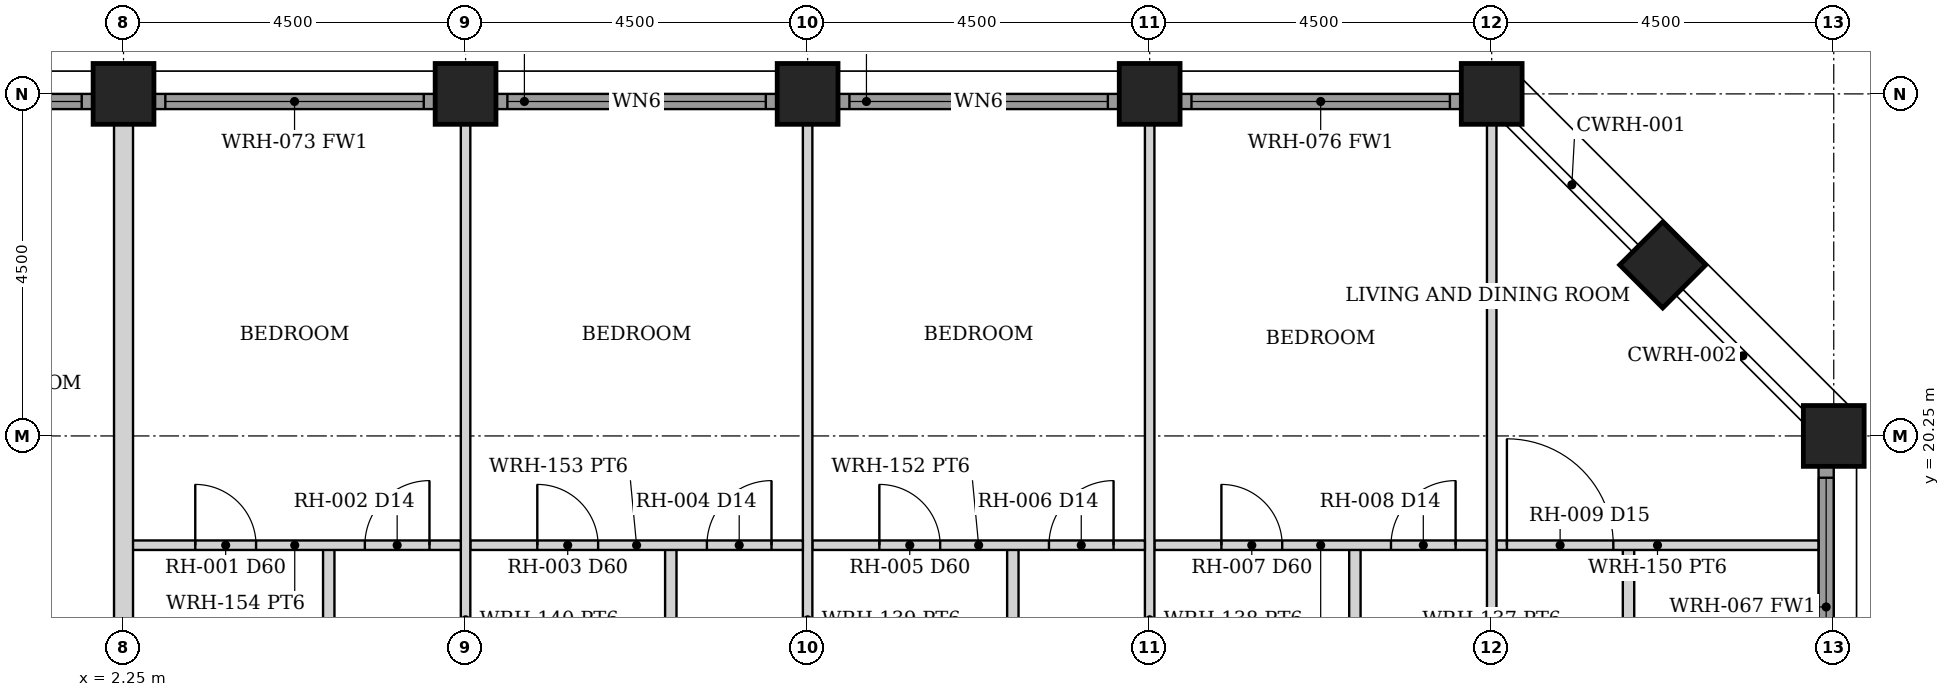
"""IFC4 building model, lengths in metres.
Left out: names, types, materials, properties, quantities, classifications, styles, units other than length and angle.
Written with IfcOpenShell. Run it as: python <this file> out.ifc"""

import sys

from ifc_helpers import new_model, si_unit, direction, frame, frame_2d, origin, origin_2d, place, context, subcontext, project, spatial, rectangle, hollow_rectangle, extrude, element, fill, save


model = new_model("IFC4")
c1 = context("Model", 3, precision=1e-05, world=origin(), true_north=direction((0.0, 1.0)))
c2 = subcontext(c1, "Body", "Model", "MODEL_VIEW")
j1 = project(units=[si_unit("LENGTHUNIT", "METRE"), si_unit("PLANEANGLEUNIT", "RADIAN")], contexts=[c1])
p1 = place(None, origin())
s1 = spatial("IfcSite", under=j1, at=p1, CompositionType="ELEMENT")
p2 = place(p1, origin())
s2 = spatial("IfcBuilding", under=s1, at=p2, CompositionType="ELEMENT")
p3 = place(p2, frame((0.0, 0.0, 103.5)))
s3 = spatial("IfcBuildingStorey", under=s2, at=p3, CompositionType="ELEMENT", Elevation=103.5)
for number, where, z_axis, x_axis in (
    (1, (2.25, 24.75, 0.0), (0.0, 0.0, 1.0), (0.0, 1.0, 0.0)),
    (2, (6.75, 24.75, 0.0), (0.0, 0.0, 1.0), (0.0, 1.0, 0.0)),
    (3, (11.25, 24.75, 0.0), (0.0, 0.0, 1.0), (0.0, 1.0, 0.0)),
    (4, (15.75, 24.75, 0.0), (0.0, 0.0, 1.0), (0.0, 1.0, 0.0)),
    (5, (20.25, 24.75, 0.0), (0.0, 0.0, 1.0), (0.0, 1.0, 0.0)),
    (6, (24.75, 20.25, 0.0), (0.0, 0.0, 1.0), (1.0, 0.0, 0.0)),
    (7, (22.5, 22.5, 0.0), (0.0, 0.0, 1.0), (0.707, 0.707, 0.0)),
):
    element("IfcColumn", number, at=place(p3, frame(where, z_axis=z_axis, x_axis=x_axis)), inside=s3, PredefinedType="COLUMN", context=c2, shape_type="SweptSolid", body=[
        extrude(hollow_rectangle(XDim=0.8, YDim=0.8, WallThickness=0.06, at=origin_2d()), origin(), (0.0, 0.0, 1.0), 3.5),
    ])
p4 = place(p3, frame((24.65, 16.155, 0.0), z_axis=(0.0, 0.0, 1.0), x_axis=(0.0, 1.0, 0.0)))
e8 = element("IfcWall", 8, at=p4, inside=s3, PredefinedType="SOLIDWALL", context=c2, shape_type="SweptSolid", body=[
    extrude(rectangle(XDim=3.69, YDim=0.2, at=frame_2d((1.845, 0.0))), origin(), (0.0, 0.0, 1.0), 2.279),
])
p5 = place(p4, frame((0.145, 0.0, 0.3)))
e9 = element("IfcOpeningElement", 9, at=p5, cuts=e8, PredefinedType="OPENING", context=c2, shape_type="SweptSolid", body=[
    extrude(rectangle(XDim=3.4, YDim=1.829, at=frame_2d((1.7, 0.915))), frame((0.0, 0.11, 0.0), z_axis=(0.0, -1.0, 0.0), x_axis=(1.0, 0.0, 0.0)), (0.0, 0.0, 1.0), 0.22),
])
p6 = place(p3, frame((-1.845, 24.65, 0.0), z_axis=(0.0, 0.0, 1.0), x_axis=(1.0, 0.0, 0.0)))
e10 = element("IfcWall", 10, at=p6, inside=s3, PredefinedType="SOLIDWALL", context=c2, shape_type="SweptSolid", body=[
    extrude(rectangle(XDim=3.69, YDim=0.2, at=frame_2d((1.845, 0.0))), origin(), (0.0, 0.0, 1.0), 2.279),
])
p7 = place(p6, frame((0.145, 0.0, 0.3)))
e11 = element("IfcOpeningElement", 11, at=p7, cuts=e10, PredefinedType="OPENING", context=c2, shape_type="SweptSolid", body=[
    extrude(rectangle(XDim=3.4, YDim=1.829, at=frame_2d((1.7, 0.915))), frame((0.0, 0.11, 0.0), z_axis=(0.0, -1.0, 0.0), x_axis=(1.0, 0.0, 0.0)), (0.0, 0.0, 1.0), 0.22),
])
p8 = place(p3, frame((2.655, 24.65, 0.0), z_axis=(0.0, 0.0, 1.0), x_axis=(1.0, 0.0, 0.0)))
e12 = element("IfcWall", 12, at=p8, inside=s3, PredefinedType="SOLIDWALL", context=c2, shape_type="SweptSolid", body=[
    extrude(rectangle(XDim=3.69, YDim=0.2, at=frame_2d((1.845, 0.0))), origin(), (0.0, 0.0, 1.0), 2.279),
])
p9 = place(p8, frame((0.145, 0.0, 0.3)))
e13 = element("IfcOpeningElement", 13, at=p9, cuts=e12, PredefinedType="OPENING", context=c2, shape_type="SweptSolid", body=[
    extrude(rectangle(XDim=3.4, YDim=1.829, at=frame_2d((1.7, 0.915))), frame((0.0, 0.11, 0.0), z_axis=(0.0, -1.0, 0.0), x_axis=(1.0, 0.0, 0.0)), (0.0, 0.0, 1.0), 0.22),
])
p10 = place(p3, frame((7.155, 24.65, 0.0), z_axis=(0.0, 0.0, 1.0), x_axis=(1.0, 0.0, 0.0)))
e14 = element("IfcWall", 14, at=p10, inside=s3, PredefinedType="SOLIDWALL", context=c2, shape_type="SweptSolid", body=[
    extrude(rectangle(XDim=3.69, YDim=0.2, at=frame_2d((1.845, 0.0))), origin(), (0.0, 0.0, 1.0), 2.279),
])
p11 = place(p10, frame((0.145, 0.0, 0.3)))
e15 = element("IfcOpeningElement", 15, at=p11, cuts=e14, PredefinedType="OPENING", context=c2, shape_type="SweptSolid", body=[
    extrude(rectangle(XDim=3.4, YDim=1.829, at=frame_2d((1.7, 0.915))), frame((0.0, 0.11, 0.0), z_axis=(0.0, -1.0, 0.0), x_axis=(1.0, 0.0, 0.0)), (0.0, 0.0, 1.0), 0.22),
])
p12 = place(p3, frame((11.655, 24.65, 0.0), z_axis=(0.0, 0.0, 1.0), x_axis=(1.0, 0.0, 0.0)))
e16 = element("IfcWall", 16, at=p12, inside=s3, PredefinedType="SOLIDWALL", context=c2, shape_type="SweptSolid", body=[
    extrude(rectangle(XDim=3.69, YDim=0.2, at=frame_2d((1.845, 0.0))), origin(), (0.0, 0.0, 1.0), 2.279),
])
p13 = place(p12, frame((0.145, 0.0, 0.3)))
e17 = element("IfcOpeningElement", 17, at=p13, cuts=e16, PredefinedType="OPENING", context=c2, shape_type="SweptSolid", body=[
    extrude(rectangle(XDim=3.4, YDim=1.829, at=frame_2d((1.7, 0.915))), frame((0.0, 0.11, 0.0), z_axis=(0.0, -1.0, 0.0), x_axis=(1.0, 0.0, 0.0)), (0.0, 0.0, 1.0), 0.22),
])
p14 = place(p3, frame((16.155, 24.65, 0.0), z_axis=(0.0, 0.0, 1.0), x_axis=(1.0, 0.0, 0.0)))
e18 = element("IfcWall", 18, at=p14, inside=s3, PredefinedType="SOLIDWALL", context=c2, shape_type="SweptSolid", body=[
    extrude(rectangle(XDim=3.69, YDim=0.2, at=frame_2d((1.845, 0.0))), origin(), (0.0, 0.0, 1.0), 2.279),
])
p15 = place(p14, frame((0.145, 0.0, 0.3)))
e19 = element("IfcOpeningElement", 19, at=p15, cuts=e18, PredefinedType="OPENING", context=c2, shape_type="SweptSolid", body=[
    extrude(rectangle(XDim=3.4, YDim=1.829, at=frame_2d((1.7, 0.915))), frame((0.0, 0.11, 0.0), z_axis=(0.0, -1.0, 0.0), x_axis=(1.0, 0.0, 0.0)), (0.0, 0.0, 1.0), 0.22),
])
p16 = place(p3, frame((22.05, 11.312, 0.0), z_axis=(0.0, 0.0, 1.0), x_axis=(0.0, 1.0, 0.0)))
e20 = element("IfcWall", 20, at=p16, inside=s3, PredefinedType="PARTITIONING", context=c2, shape_type="SweptSolid", body=[
    extrude(rectangle(XDim=7.5, YDim=0.15, at=frame_2d((3.75, 0.0))), origin(), (0.0, 0.0, 1.0), 2.279),
])
p17 = place(p16, frame((3.3, 0.0, 0.0)))
e21 = element("IfcOpeningElement", 21, at=p17, cuts=e20, PredefinedType="OPENING", context=c2, shape_type="SweptSolid", body=[
    extrude(rectangle(XDim=0.9, YDim=2.1, at=frame_2d((0.45, 1.05))), frame((0.0, 0.085, 0.0), z_axis=(0.0, -1.0, 0.0), x_axis=(1.0, 0.0, 0.0)), (0.0, 0.0, 1.0), 0.17),
])
p18 = place(p3, frame((20.312, 18.812, 0.0), z_axis=(0.0, 0.0, 1.0), x_axis=(1.0, 0.0, 0.0)))
e22 = element("IfcWall", 22, at=p18, inside=s3, PredefinedType="PARTITIONING", context=c2, shape_type="SweptSolid", body=[
    extrude(rectangle(XDim=4.238, YDim=0.125, at=frame_2d((2.119, 0.0))), origin(), (0.0, 0.0, 1.0), 2.279),
])
p19 = place(p18, frame((0.137, 0.0, 0.0)))
e23 = element("IfcOpeningElement", 23, at=p19, cuts=e22, PredefinedType="OPENING", context=c2, shape_type="SweptSolid", body=[
    extrude(rectangle(XDim=1.4, YDim=2.1, at=frame_2d((0.7, 1.05))), frame((0.0, 0.073, 0.0), z_axis=(0.0, -1.0, 0.0), x_axis=(1.0, 0.0, 0.0)), (0.0, 0.0, 1.0), 0.145),
])
p20 = place(p3, frame((20.25, 11.312, 0.0), z_axis=(0.0, 0.0, 1.0), x_axis=(0.0, 1.0, 0.0)))
e24 = element("IfcWall", 24, at=p20, inside=s3, PredefinedType="PARTITIONING", context=c2, shape_type="SweptSolid", body=[
    extrude(rectangle(XDim=13.038, YDim=0.125, at=frame_2d((6.519, 0.0))), origin(), (0.0, 0.0, 1.0), 2.279),
])
p21 = place(p3, frame((18.45, 11.312, 0.0), z_axis=(0.0, 0.0, 1.0), x_axis=(0.0, 1.0, 0.0)))
e25 = element("IfcWall", 25, at=p21, inside=s3, PredefinedType="PARTITIONING", context=c2, shape_type="SweptSolid", body=[
    extrude(rectangle(XDim=7.5, YDim=0.15, at=frame_2d((3.75, 0.0))), origin(), (0.0, 0.0, 1.0), 2.279),
])
p22 = place(p21, frame((0.9, 0.0, 0.0)))
e26 = element("IfcOpeningElement", 26, at=p22, cuts=e25, PredefinedType="OPENING", context=c2, shape_type="SweptSolid", body=[
    extrude(rectangle(XDim=0.8, YDim=2.1, at=frame_2d((0.4, 1.05))), frame((0.0, 0.085, 0.0), z_axis=(0.0, -1.0, 0.0), x_axis=(1.0, 0.0, 0.0)), (0.0, 0.0, 1.0), 0.17),
])
p23 = place(p3, frame((15.812, 18.812, 0.0), z_axis=(0.0, 0.0, 1.0), x_axis=(1.0, 0.0, 0.0)))
e27 = element("IfcWall", 27, at=p23, inside=s3, PredefinedType="PARTITIONING", context=c2, shape_type="SweptSolid", body=[
    extrude(rectangle(XDim=4.375, YDim=0.125, at=frame_2d((2.188, 0.0))), origin(), (0.0, 0.0, 1.0), 2.279),
])
p24 = place(p23, frame((3.113, 0.0, 0.0)))
e28 = element("IfcOpeningElement", 28, at=p24, cuts=e27, PredefinedType="OPENING", context=c2, shape_type="SweptSolid", body=[
    extrude(rectangle(XDim=0.85, YDim=2.1, at=frame_2d((0.425, 1.05))), frame((0.0, 0.073, 0.0), z_axis=(0.0, -1.0, 0.0), x_axis=(1.0, 0.0, 0.0)), (0.0, 0.0, 1.0), 0.145),
])
p25 = place(p23, frame((0.881, 0.0, 0.0)))
e29 = element("IfcOpeningElement", 29, at=p25, cuts=e27, PredefinedType="OPENING", context=c2, shape_type="SweptSolid", body=[
    extrude(rectangle(XDim=0.8, YDim=2.1, at=frame_2d((0.4, 1.05))), frame((0.0, 0.073, 0.0), z_axis=(0.0, -1.0, 0.0), x_axis=(1.0, 0.0, 0.0)), (0.0, 0.0, 1.0), 0.145),
])
p26 = place(p3, frame((15.75, 11.312, 0.0), z_axis=(0.0, 0.0, 1.0), x_axis=(0.0, 1.0, 0.0)))
e30 = element("IfcWall", 30, at=p26, inside=s3, PredefinedType="PARTITIONING", context=c2, shape_type="SweptSolid", body=[
    extrude(rectangle(XDim=13.038, YDim=0.125, at=frame_2d((6.519, 0.0))), origin(), (0.0, 0.0, 1.0), 2.279),
])
p27 = place(p3, frame((13.95, 11.312, 0.0), z_axis=(0.0, 0.0, 1.0), x_axis=(0.0, 1.0, 0.0)))
e31 = element("IfcWall", 31, at=p27, inside=s3, PredefinedType="PARTITIONING", context=c2, shape_type="SweptSolid", body=[
    extrude(rectangle(XDim=7.5, YDim=0.15, at=frame_2d((3.75, 0.0))), origin(), (0.0, 0.0, 1.0), 2.279),
])
p28 = place(p27, frame((0.9, 0.0, 0.0)))
e32 = element("IfcOpeningElement", 32, at=p28, cuts=e31, PredefinedType="OPENING", context=c2, shape_type="SweptSolid", body=[
    extrude(rectangle(XDim=0.8, YDim=2.1, at=frame_2d((0.4, 1.05))), frame((0.0, 0.085, 0.0), z_axis=(0.0, -1.0, 0.0), x_axis=(1.0, 0.0, 0.0)), (0.0, 0.0, 1.0), 0.17),
])
p29 = place(p3, frame((11.312, 18.812, 0.0), z_axis=(0.0, 0.0, 1.0), x_axis=(1.0, 0.0, 0.0)))
e33 = element("IfcWall", 33, at=p29, inside=s3, PredefinedType="PARTITIONING", context=c2, shape_type="SweptSolid", body=[
    extrude(rectangle(XDim=4.375, YDim=0.125, at=frame_2d((2.188, 0.0))), origin(), (0.0, 0.0, 1.0), 2.279),
])
p30 = place(p29, frame((3.113, 0.0, 0.0)))
e34 = element("IfcOpeningElement", 34, at=p30, cuts=e33, PredefinedType="OPENING", context=c2, shape_type="SweptSolid", body=[
    extrude(rectangle(XDim=0.85, YDim=2.1, at=frame_2d((0.425, 1.05))), frame((0.0, 0.073, 0.0), z_axis=(0.0, -1.0, 0.0), x_axis=(1.0, 0.0, 0.0)), (0.0, 0.0, 1.0), 0.145),
])
p31 = place(p29, frame((0.881, 0.0, 0.0)))
e35 = element("IfcOpeningElement", 35, at=p31, cuts=e33, PredefinedType="OPENING", context=c2, shape_type="SweptSolid", body=[
    extrude(rectangle(XDim=0.8, YDim=2.1, at=frame_2d((0.4, 1.05))), frame((0.0, 0.073, 0.0), z_axis=(0.0, -1.0, 0.0), x_axis=(1.0, 0.0, 0.0)), (0.0, 0.0, 1.0), 0.145),
])
p32 = place(p3, frame((11.25, 11.312, 0.0), z_axis=(0.0, 0.0, 1.0), x_axis=(0.0, 1.0, 0.0)))
e36 = element("IfcWall", 36, at=p32, inside=s3, PredefinedType="PARTITIONING", context=c2, shape_type="SweptSolid", body=[
    extrude(rectangle(XDim=13.038, YDim=0.125, at=frame_2d((6.519, 0.0))), origin(), (0.0, 0.0, 1.0), 2.279),
])
p33 = place(p3, frame((9.45, 11.312, 0.0), z_axis=(0.0, 0.0, 1.0), x_axis=(0.0, 1.0, 0.0)))
e37 = element("IfcWall", 37, at=p33, inside=s3, PredefinedType="PARTITIONING", context=c2, shape_type="SweptSolid", body=[
    extrude(rectangle(XDim=7.5, YDim=0.15, at=frame_2d((3.75, 0.0))), origin(), (0.0, 0.0, 1.0), 2.279),
])
p34 = place(p33, frame((0.9, 0.0, 0.0)))
e38 = element("IfcOpeningElement", 38, at=p34, cuts=e37, PredefinedType="OPENING", context=c2, shape_type="SweptSolid", body=[
    extrude(rectangle(XDim=0.8, YDim=2.1, at=frame_2d((0.4, 1.05))), frame((0.0, 0.085, 0.0), z_axis=(0.0, -1.0, 0.0), x_axis=(1.0, 0.0, 0.0)), (0.0, 0.0, 1.0), 0.17),
])
p35 = place(p3, frame((6.812, 18.812, 0.0), z_axis=(0.0, 0.0, 1.0), x_axis=(1.0, 0.0, 0.0)))
e39 = element("IfcWall", 39, at=p35, inside=s3, PredefinedType="PARTITIONING", context=c2, shape_type="SweptSolid", body=[
    extrude(rectangle(XDim=4.375, YDim=0.125, at=frame_2d((2.188, 0.0))), origin(), (0.0, 0.0, 1.0), 2.279),
])
p36 = place(p35, frame((3.113, 0.0, 0.0)))
e40 = element("IfcOpeningElement", 40, at=p36, cuts=e39, PredefinedType="OPENING", context=c2, shape_type="SweptSolid", body=[
    extrude(rectangle(XDim=0.85, YDim=2.1, at=frame_2d((0.425, 1.05))), frame((0.0, 0.073, 0.0), z_axis=(0.0, -1.0, 0.0), x_axis=(1.0, 0.0, 0.0)), (0.0, 0.0, 1.0), 0.145),
])
p37 = place(p35, frame((0.881, 0.0, 0.0)))
e41 = element("IfcOpeningElement", 41, at=p37, cuts=e39, PredefinedType="OPENING", context=c2, shape_type="SweptSolid", body=[
    extrude(rectangle(XDim=0.8, YDim=2.1, at=frame_2d((0.4, 1.05))), frame((0.0, 0.073, 0.0), z_axis=(0.0, -1.0, 0.0), x_axis=(1.0, 0.0, 0.0)), (0.0, 0.0, 1.0), 0.145),
])
p38 = place(p3, frame((6.75, 11.312, 0.0), z_axis=(0.0, 0.0, 1.0), x_axis=(0.0, 1.0, 0.0)))
e42 = element("IfcWall", 42, at=p38, inside=s3, PredefinedType="PARTITIONING", context=c2, shape_type="SweptSolid", body=[
    extrude(rectangle(XDim=13.038, YDim=0.125, at=frame_2d((6.519, 0.0))), origin(), (0.0, 0.0, 1.0), 2.279),
])
p39 = place(p3, frame((4.95, 11.312, 0.0), z_axis=(0.0, 0.0, 1.0), x_axis=(0.0, 1.0, 0.0)))
e43 = element("IfcWall", 43, at=p39, inside=s3, PredefinedType="PARTITIONING", context=c2, shape_type="SweptSolid", body=[
    extrude(rectangle(XDim=7.5, YDim=0.15, at=frame_2d((3.75, 0.0))), origin(), (0.0, 0.0, 1.0), 2.279),
])
p40 = place(p39, frame((0.9, 0.0, 0.0)))
e44 = element("IfcOpeningElement", 44, at=p40, cuts=e43, PredefinedType="OPENING", context=c2, shape_type="SweptSolid", body=[
    extrude(rectangle(XDim=0.8, YDim=2.1, at=frame_2d((0.4, 1.05))), frame((0.0, 0.085, 0.0), z_axis=(0.0, -1.0, 0.0), x_axis=(1.0, 0.0, 0.0)), (0.0, 0.0, 1.0), 0.17),
])
p41 = place(p3, frame((2.317, 18.812, 0.0), z_axis=(0.0, 0.0, 1.0), x_axis=(1.0, 0.0, 0.0)))
e45 = element("IfcWall", 45, at=p41, inside=s3, PredefinedType="PARTITIONING", context=c2, shape_type="SweptSolid", body=[
    extrude(rectangle(XDim=4.37, YDim=0.125, at=frame_2d((2.185, 0.0))), origin(), (0.0, 0.0, 1.0), 2.279),
])
p42 = place(p41, frame((3.107, 0.0, 0.0)))
e46 = element("IfcOpeningElement", 46, at=p42, cuts=e45, PredefinedType="OPENING", context=c2, shape_type="SweptSolid", body=[
    extrude(rectangle(XDim=0.85, YDim=2.1, at=frame_2d((0.425, 1.05))), frame((0.0, 0.073, 0.0), z_axis=(0.0, -1.0, 0.0), x_axis=(1.0, 0.0, 0.0)), (0.0, 0.0, 1.0), 0.145),
])
p43 = place(p41, frame((0.876, 0.0, 0.0)))
e47 = element("IfcOpeningElement", 47, at=p43, cuts=e45, PredefinedType="OPENING", context=c2, shape_type="SweptSolid", body=[
    extrude(rectangle(XDim=0.8, YDim=2.1, at=frame_2d((0.4, 1.05))), frame((0.0, 0.073, 0.0), z_axis=(0.0, -1.0, 0.0), x_axis=(1.0, 0.0, 0.0)), (0.0, 0.0, 1.0), 0.145),
])
p44 = place(p3, frame((2.25, 9.2, 0.0), z_axis=(0.0, 0.0, 1.0), x_axis=(0.0, 1.0, 0.0)))
e48 = element("IfcWall", 48, at=p44, inside=s3, PredefinedType="PARTITIONING", context=c2, shape_type="SweptSolid", body=[
    extrude(rectangle(XDim=15.15, YDim=0.25, at=frame_2d((7.575, 0.0))), origin(), (0.0, 0.0, 1.0), 2.279),
])
p45 = place(p5, origin())
e49 = element("IfcWindow", 49, at=p45, inside=s3, PartitioningType="SINGLE_PANEL", PredefinedType="WINDOW", context=c2, shape_type="SweptSolid", body=[
    extrude(rectangle(XDim=3.4, YDim=1.829, at=frame_2d((1.7, 0.915))), frame((0.0, 0.03, 0.0), z_axis=(0.0, -1.0, 0.0), x_axis=(1.0, 0.0, 0.0)), (0.0, 0.0, 1.0), 0.06),
])
fill(e9, e49)
p46 = place(p7, origin())
e50 = element("IfcWindow", 50, at=p46, inside=s3, PartitioningType="SINGLE_PANEL", PredefinedType="WINDOW", context=c2, shape_type="SweptSolid", body=[
    extrude(rectangle(XDim=3.4, YDim=1.829, at=frame_2d((1.7, 0.915))), frame((0.0, 0.03, 0.0), z_axis=(0.0, -1.0, 0.0), x_axis=(1.0, 0.0, 0.0)), (0.0, 0.0, 1.0), 0.06),
])
fill(e11, e50)
p47 = place(p9, origin())
e51 = element("IfcWindow", 51, at=p47, inside=s3, PartitioningType="SINGLE_PANEL", PredefinedType="WINDOW", context=c2, shape_type="SweptSolid", body=[
    extrude(rectangle(XDim=3.4, YDim=1.829, at=frame_2d((1.7, 0.915))), frame((0.0, 0.03, 0.0), z_axis=(0.0, -1.0, 0.0), x_axis=(1.0, 0.0, 0.0)), (0.0, 0.0, 1.0), 0.06),
])
fill(e13, e51)
p48 = place(p11, origin())
e52 = element("IfcWindow", 52, at=p48, inside=s3, PartitioningType="SINGLE_PANEL", PredefinedType="WINDOW", context=c2, shape_type="SweptSolid", body=[
    extrude(rectangle(XDim=3.4, YDim=1.829, at=frame_2d((1.7, 0.915))), frame((0.0, 0.03, 0.0), z_axis=(0.0, -1.0, 0.0), x_axis=(1.0, 0.0, 0.0)), (0.0, 0.0, 1.0), 0.06),
])
fill(e15, e52)
p49 = place(p13, origin())
e53 = element("IfcWindow", 53, at=p49, inside=s3, PartitioningType="SINGLE_PANEL", PredefinedType="WINDOW", context=c2, shape_type="SweptSolid", body=[
    extrude(rectangle(XDim=3.4, YDim=1.829, at=frame_2d((1.7, 0.915))), frame((0.0, 0.03, 0.0), z_axis=(0.0, -1.0, 0.0), x_axis=(1.0, 0.0, 0.0)), (0.0, 0.0, 1.0), 0.06),
])
fill(e17, e53)
p50 = place(p15, origin())
e54 = element("IfcWindow", 54, at=p50, inside=s3, PartitioningType="SINGLE_PANEL", PredefinedType="WINDOW", context=c2, shape_type="SweptSolid", body=[
    extrude(rectangle(XDim=3.4, YDim=1.829, at=frame_2d((1.7, 0.915))), frame((0.0, 0.03, 0.0), z_axis=(0.0, -1.0, 0.0), x_axis=(1.0, 0.0, 0.0)), (0.0, 0.0, 1.0), 0.06),
])
fill(e19, e54)
p51 = place(p19, origin())
e55 = element("IfcDoor", 55, at=p51, inside=s3, OperationType="SINGLE_SWING_LEFT", PredefinedType="DOOR", context=c2, shape_type="SweptSolid", body=[
    extrude(rectangle(XDim=1.4, YDim=2.1, at=frame_2d((0.7, 1.05))), frame((0.0, 0.025, 0.0), z_axis=(0.0, -1.0, 0.0), x_axis=(1.0, 0.0, 0.0)), (0.0, 0.0, 1.0), 0.05),
])
fill(e23, e55)
p52 = place(p24, origin())
e56 = element("IfcDoor", 56, at=p52, inside=s3, OperationType="SINGLE_SWING_RIGHT", PredefinedType="DOOR", context=c2, shape_type="SweptSolid", body=[
    extrude(rectangle(XDim=0.85, YDim=2.1, at=frame_2d((0.425, 1.05))), frame((0.0, 0.025, 0.0), z_axis=(0.0, -1.0, 0.0), x_axis=(1.0, 0.0, 0.0)), (0.0, 0.0, 1.0), 0.05),
])
fill(e28, e56)
p53 = place(p25, origin())
e57 = element("IfcDoor", 57, at=p53, inside=s3, OperationType="SINGLE_SWING_LEFT", PredefinedType="DOOR", context=c2, shape_type="SweptSolid", body=[
    extrude(rectangle(XDim=0.8, YDim=2.1, at=frame_2d((0.4, 1.05))), frame((0.0, 0.025, 0.0), z_axis=(0.0, -1.0, 0.0), x_axis=(1.0, 0.0, 0.0)), (0.0, 0.0, 1.0), 0.05),
])
fill(e29, e57)
p54 = place(p30, origin())
e58 = element("IfcDoor", 58, at=p54, inside=s3, OperationType="SINGLE_SWING_RIGHT", PredefinedType="DOOR", context=c2, shape_type="SweptSolid", body=[
    extrude(rectangle(XDim=0.85, YDim=2.1, at=frame_2d((0.425, 1.05))), frame((0.0, 0.025, 0.0), z_axis=(0.0, -1.0, 0.0), x_axis=(1.0, 0.0, 0.0)), (0.0, 0.0, 1.0), 0.05),
])
fill(e34, e58)
p55 = place(p31, origin())
e59 = element("IfcDoor", 59, at=p55, inside=s3, OperationType="SINGLE_SWING_LEFT", PredefinedType="DOOR", context=c2, shape_type="SweptSolid", body=[
    extrude(rectangle(XDim=0.8, YDim=2.1, at=frame_2d((0.4, 1.05))), frame((0.0, 0.025, 0.0), z_axis=(0.0, -1.0, 0.0), x_axis=(1.0, 0.0, 0.0)), (0.0, 0.0, 1.0), 0.05),
])
fill(e35, e59)
p56 = place(p36, origin())
e60 = element("IfcDoor", 60, at=p56, inside=s3, OperationType="SINGLE_SWING_RIGHT", PredefinedType="DOOR", context=c2, shape_type="SweptSolid", body=[
    extrude(rectangle(XDim=0.85, YDim=2.1, at=frame_2d((0.425, 1.05))), frame((0.0, 0.025, 0.0), z_axis=(0.0, -1.0, 0.0), x_axis=(1.0, 0.0, 0.0)), (0.0, 0.0, 1.0), 0.05),
])
fill(e40, e60)
p57 = place(p37, origin())
e61 = element("IfcDoor", 61, at=p57, inside=s3, OperationType="SINGLE_SWING_LEFT", PredefinedType="DOOR", context=c2, shape_type="SweptSolid", body=[
    extrude(rectangle(XDim=0.8, YDim=2.1, at=frame_2d((0.4, 1.05))), frame((0.0, 0.025, 0.0), z_axis=(0.0, -1.0, 0.0), x_axis=(1.0, 0.0, 0.0)), (0.0, 0.0, 1.0), 0.05),
])
fill(e41, e61)
p58 = place(p42, origin())
e62 = element("IfcDoor", 62, at=p58, inside=s3, OperationType="SINGLE_SWING_RIGHT", PredefinedType="DOOR", context=c2, shape_type="SweptSolid", body=[
    extrude(rectangle(XDim=0.85, YDim=2.1, at=frame_2d((0.425, 1.05))), frame((0.0, 0.025, 0.0), z_axis=(0.0, -1.0, 0.0), x_axis=(1.0, 0.0, 0.0)), (0.0, 0.0, 1.0), 0.05),
])
fill(e46, e62)
p59 = place(p43, origin())
e63 = element("IfcDoor", 63, at=p59, inside=s3, OperationType="SINGLE_SWING_LEFT", PredefinedType="DOOR", context=c2, shape_type="SweptSolid", body=[
    extrude(rectangle(XDim=0.8, YDim=2.1, at=frame_2d((0.4, 1.05))), frame((0.0, 0.025, 0.0), z_axis=(0.0, -1.0, 0.0), x_axis=(1.0, 0.0, 0.0)), (0.0, 0.0, 1.0), 0.05),
])
fill(e47, e63)
save(model, sys.argv[1])
